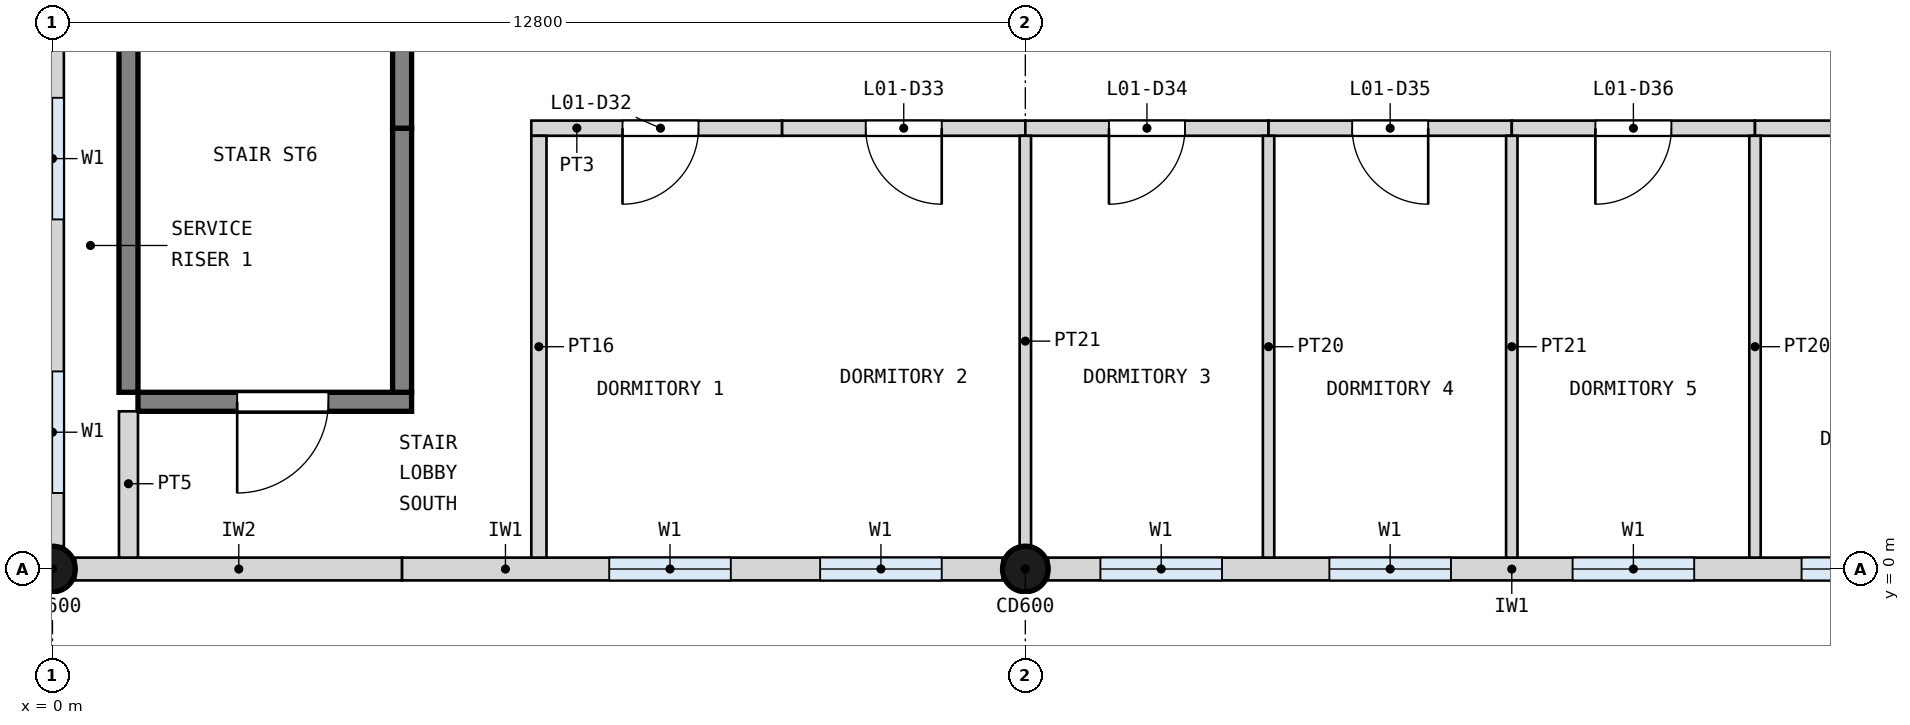
"""IFC4 building model, lengths in metres.
Left out: names, types, materials, properties, quantities, classifications, styles, units other than length and angle.
Written with IfcOpenShell. Run it as: python <this file> out.ifc"""

import sys

from ifc_helpers import new_model, si_unit, direction, frame, frame_2d, origin, origin_2d, place, context, subcontext, project, spatial, rectangle, circle, extrude, element, fill, save


model = new_model("IFC4")
c1 = context("Model", 3, precision=1e-05, world=origin(), true_north=direction((0.0, 1.0)))
c2 = subcontext(c1, "Body", "Model", "MODEL_VIEW")
j1 = project(units=[si_unit("LENGTHUNIT", "METRE"), si_unit("PLANEANGLEUNIT", "RADIAN")], contexts=[c1])
p1 = place(None, origin())
s1 = spatial("IfcSite", under=j1, at=p1, CompositionType="ELEMENT")
p2 = place(p1, origin())
s2 = spatial("IfcBuilding", under=s1, at=p2, CompositionType="ELEMENT")
p3 = place(p2, frame((0.0, 0.0, 4.2)))
s3 = spatial("IfcBuildingStorey", under=s2, at=p3, CompositionType="ELEMENT", Elevation=4.2)
for number, where, z_axis, x_axis in (
    (1, (0.0, 0.0, 0.0), (0.0, 0.0, 1.0), (1.0, 0.0, 0.0)),
    (2, (12.8, 0.0, 0.0), (0.0, 0.0, 1.0), (1.0, 0.0, 0.0)),
):
    element("IfcColumn", number, at=place(p3, frame(where, z_axis=z_axis, x_axis=x_axis)), inside=s3, PredefinedType="COLUMN", context=c2, shape_type="SweptSolid", body=[
        extrude(circle(Radius=0.3, at=origin_2d()), origin(), (0.0, 0.0, 1.0), 4.2),
    ])
p4 = place(p3, frame((0.3, 0.0, 0.0), z_axis=(0.0, 0.0, 1.0), x_axis=(1.0, 0.0, 0.0)))
e3 = element("IfcWall", 3, at=p4, inside=s3, PredefinedType="SOLIDWALL", context=c2, shape_type="SweptSolid", body=[
    extrude(rectangle(XDim=4.3, YDim=0.3, at=frame_2d((2.15, 0.0))), origin(), (0.0, 0.0, 1.0), 3.0),
])
p5 = place(p3, frame((4.6, 0.0, 0.0), z_axis=(0.0, 0.0, 1.0), x_axis=(1.0, 0.0, 0.0)))
e4 = element("IfcWall", 4, at=p5, inside=s3, PredefinedType="SOLIDWALL", context=c2, shape_type="SweptSolid", body=[
    extrude(rectangle(XDim=7.9, YDim=0.3, at=frame_2d((3.95, 0.0))), origin(), (0.0, 0.0, 1.0), 3.0),
])
p6 = place(p5, frame((2.725, 0.0, 1.0)))
e5 = element("IfcOpeningElement", 5, at=p6, cuts=e4, PredefinedType="OPENING", context=c2, shape_type="SweptSolid", body=[
    extrude(rectangle(XDim=1.6, YDim=1.8, at=frame_2d((0.8, 0.9))), frame((0.0, 0.16, 0.0), z_axis=(0.0, -1.0, 0.0), x_axis=(1.0, 0.0, 0.0)), (0.0, 0.0, 1.0), 0.32),
])
p7 = place(p5, frame((5.5, 0.0, 1.0)))
e6 = element("IfcOpeningElement", 6, at=p7, cuts=e4, PredefinedType="OPENING", context=c2, shape_type="SweptSolid", body=[
    extrude(rectangle(XDim=1.6, YDim=1.8, at=frame_2d((0.8, 0.9))), frame((0.0, 0.16, 0.0), z_axis=(0.0, -1.0, 0.0), x_axis=(1.0, 0.0, 0.0)), (0.0, 0.0, 1.0), 0.32),
])
p8 = place(p3, frame((13.1, 0.0, 0.0), z_axis=(0.0, 0.0, 1.0), x_axis=(1.0, 0.0, 0.0)))
e7 = element("IfcWall", 7, at=p8, inside=s3, PredefinedType="SOLIDWALL", context=c2, shape_type="SweptSolid", body=[
    extrude(rectangle(XDim=12.2, YDim=0.3, at=frame_2d((6.1, 0.0))), origin(), (0.0, 0.0, 1.0), 3.0),
])
p9 = place(p8, frame((0.688, 0.0, 1.0)))
e8 = element("IfcOpeningElement", 8, at=p9, cuts=e7, PredefinedType="OPENING", context=c2, shape_type="SweptSolid", body=[
    extrude(rectangle(XDim=1.6, YDim=1.8, at=frame_2d((0.8, 0.9))), frame((0.0, 0.16, 0.0), z_axis=(0.0, -1.0, 0.0), x_axis=(1.0, 0.0, 0.0)), (0.0, 0.0, 1.0), 0.32),
])
p10 = place(p8, frame((3.7, 0.0, 1.0)))
e9 = element("IfcOpeningElement", 9, at=p10, cuts=e7, PredefinedType="OPENING", context=c2, shape_type="SweptSolid", body=[
    extrude(rectangle(XDim=1.6, YDim=1.8, at=frame_2d((0.8, 0.9))), frame((0.0, 0.16, 0.0), z_axis=(0.0, -1.0, 0.0), x_axis=(1.0, 0.0, 0.0)), (0.0, 0.0, 1.0), 0.32),
])
p11 = place(p8, frame((6.9, 0.0, 1.0)))
e10 = element("IfcOpeningElement", 10, at=p11, cuts=e7, PredefinedType="OPENING", context=c2, shape_type="SweptSolid", body=[
    extrude(rectangle(XDim=1.6, YDim=1.8, at=frame_2d((0.8, 0.9))), frame((0.0, 0.16, 0.0), z_axis=(0.0, -1.0, 0.0), x_axis=(1.0, 0.0, 0.0)), (0.0, 0.0, 1.0), 0.32),
])
p12 = place(p8, frame((9.913, 0.0, 1.0)))
e11 = element("IfcOpeningElement", 11, at=p12, cuts=e7, PredefinedType="OPENING", context=c2, shape_type="SweptSolid", body=[
    extrude(rectangle(XDim=1.6, YDim=1.8, at=frame_2d((0.8, 0.9))), frame((0.0, 0.16, 0.0), z_axis=(0.0, -1.0, 0.0), x_axis=(1.0, 0.0, 0.0)), (0.0, 0.0, 1.0), 0.32),
])
p13 = place(p3, frame((0.0, 0.3, 0.0), z_axis=(0.0, 0.0, 1.0), x_axis=(0.0, 1.0, 0.0)))
e12 = element("IfcWall", 12, at=p13, inside=s3, PredefinedType="SOLIDWALL", context=c2, shape_type="SweptSolid", body=[
    extrude(rectangle(XDim=13.8, YDim=0.3, at=frame_2d((6.9, 0.0))), origin(), (0.0, 0.0, 1.0), 2.9),
])
p14 = place(p13, frame((0.7, 0.0, 1.0)))
e13 = element("IfcOpeningElement", 13, at=p14, cuts=e12, PredefinedType="OPENING", context=c2, shape_type="SweptSolid", body=[
    extrude(rectangle(XDim=1.6, YDim=1.8, at=frame_2d((0.8, 0.9))), frame((0.0, 0.16, 0.0), z_axis=(0.0, -1.0, 0.0), x_axis=(1.0, 0.0, 0.0)), (0.0, 0.0, 1.0), 0.32),
])
p15 = place(p13, frame((4.3, 0.0, 1.0)))
e14 = element("IfcOpeningElement", 14, at=p15, cuts=e12, PredefinedType="OPENING", context=c2, shape_type="SweptSolid", body=[
    extrude(rectangle(XDim=1.6, YDim=1.8, at=frame_2d((0.8, 0.9))), frame((0.0, 0.16, 0.0), z_axis=(0.0, -1.0, 0.0), x_axis=(1.0, 0.0, 0.0)), (0.0, 0.0, 1.0), 0.32),
])
p16 = place(p13, frame((11.5, 0.0, 1.0)))
e15 = element("IfcOpeningElement", 15, at=p16, cuts=e12, PredefinedType="OPENING", context=c2, shape_type="SweptSolid", body=[
    extrude(rectangle(XDim=1.6, YDim=1.8, at=frame_2d((0.8, 0.9))), frame((0.0, 0.16, 0.0), z_axis=(0.0, -1.0, 0.0), x_axis=(1.0, 0.0, 0.0)), (0.0, 0.0, 1.0), 0.32),
])
p17 = place(p3, frame((1.125, 2.2, 0.0), z_axis=(0.0, 0.0, 1.0), x_axis=(1.0, 0.0, 0.0)))
e16 = element("IfcWall", 16, at=p17, inside=s3, PredefinedType="SHEAR", context=c2, shape_type="SweptSolid", body=[
    extrude(rectangle(XDim=3.6, YDim=0.25, at=frame_2d((1.8, 0.0))), origin(), (0.0, 0.0, 1.0), 3.9),
])
p18 = place(p17, frame((1.305, 0.0, 0.0)))
e17 = element("IfcOpeningElement", 17, at=p18, cuts=e16, PredefinedType="OPENING", context=c2, shape_type="SweptSolid", body=[
    extrude(rectangle(XDim=1.2, YDim=2.1, at=frame_2d((0.6, 1.05))), frame((0.0, 0.135, 0.0), z_axis=(0.0, -1.0, 0.0), x_axis=(1.0, 0.0, 0.0)), (0.0, 0.0, 1.0), 0.27),
])
p19 = place(p3, frame((6.3, 5.8, 0.0), z_axis=(0.0, 0.0, 1.0), x_axis=(1.0, 0.0, 0.0)))
e18 = element("IfcWall", 18, at=p19, inside=s3, PredefinedType="PARTITIONING", context=c2, shape_type="SweptSolid", body=[
    extrude(rectangle(XDim=3.3, YDim=0.2, at=frame_2d((1.65, 0.0))), origin(), (0.0, 0.0, 1.0), 3.9),
])
p20 = place(p19, frame((1.2, 0.0, 0.0)))
e19 = element("IfcOpeningElement", 19, at=p20, cuts=e18, PredefinedType="OPENING", context=c2, shape_type="SweptSolid", body=[
    extrude(rectangle(XDim=1.0, YDim=2.1, at=frame_2d((0.5, 1.05))), frame((0.0, 0.11, 0.0), z_axis=(0.0, -1.0, 0.0), x_axis=(1.0, 0.0, 0.0)), (0.0, 0.0, 1.0), 0.22),
])
p21 = place(p3, frame((9.6, 5.8, 0.0), z_axis=(0.0, 0.0, 1.0), x_axis=(1.0, 0.0, 0.0)))
e20 = element("IfcWall", 20, at=p21, inside=s3, PredefinedType="PARTITIONING", context=c2, shape_type="SweptSolid", body=[
    extrude(rectangle(XDim=3.2, YDim=0.2, at=frame_2d((1.6, 0.0))), origin(), (0.0, 0.0, 1.0), 3.9),
])
p22 = place(p21, frame((1.1, 0.0, 0.0)))
e21 = element("IfcOpeningElement", 21, at=p22, cuts=e20, PredefinedType="OPENING", context=c2, shape_type="SweptSolid", body=[
    extrude(rectangle(XDim=1.0, YDim=2.1, at=frame_2d((0.5, 1.05))), frame((0.0, 0.11, 0.0), z_axis=(0.0, -1.0, 0.0), x_axis=(1.0, 0.0, 0.0)), (0.0, 0.0, 1.0), 0.22),
])
p23 = place(p3, frame((12.8, 5.8, 0.0), z_axis=(0.0, 0.0, 1.0), x_axis=(1.0, 0.0, 0.0)))
e22 = element("IfcWall", 22, at=p23, inside=s3, PredefinedType="PARTITIONING", context=c2, shape_type="SweptSolid", body=[
    extrude(rectangle(XDim=3.2, YDim=0.2, at=frame_2d((1.6, 0.0))), origin(), (0.0, 0.0, 1.0), 3.9),
])
p24 = place(p23, frame((1.1, 0.0, 0.0)))
e23 = element("IfcOpeningElement", 23, at=p24, cuts=e22, PredefinedType="OPENING", context=c2, shape_type="SweptSolid", body=[
    extrude(rectangle(XDim=1.0, YDim=2.1, at=frame_2d((0.5, 1.05))), frame((0.0, 0.11, 0.0), z_axis=(0.0, -1.0, 0.0), x_axis=(1.0, 0.0, 0.0)), (0.0, 0.0, 1.0), 0.22),
])
p25 = place(p3, frame((16.0, 5.8, 0.0), z_axis=(0.0, 0.0, 1.0), x_axis=(1.0, 0.0, 0.0)))
e24 = element("IfcWall", 24, at=p25, inside=s3, PredefinedType="PARTITIONING", context=c2, shape_type="SweptSolid", body=[
    extrude(rectangle(XDim=3.2, YDim=0.2, at=frame_2d((1.6, 0.0))), origin(), (0.0, 0.0, 1.0), 3.9),
])
p26 = place(p25, frame((1.1, 0.0, 0.0)))
e25 = element("IfcOpeningElement", 25, at=p26, cuts=e24, PredefinedType="OPENING", context=c2, shape_type="SweptSolid", body=[
    extrude(rectangle(XDim=1.0, YDim=2.1, at=frame_2d((0.5, 1.05))), frame((0.0, 0.11, 0.0), z_axis=(0.0, -1.0, 0.0), x_axis=(1.0, 0.0, 0.0)), (0.0, 0.0, 1.0), 0.22),
])
p27 = place(p3, frame((19.2, 5.8, 0.0), z_axis=(0.0, 0.0, 1.0), x_axis=(1.0, 0.0, 0.0)))
e26 = element("IfcWall", 26, at=p27, inside=s3, PredefinedType="PARTITIONING", context=c2, shape_type="SweptSolid", body=[
    extrude(rectangle(XDim=3.2, YDim=0.2, at=frame_2d((1.6, 0.0))), origin(), (0.0, 0.0, 1.0), 3.9),
])
p28 = place(p27, frame((1.1, 0.0, 0.0)))
e27 = element("IfcOpeningElement", 27, at=p28, cuts=e26, PredefinedType="OPENING", context=c2, shape_type="SweptSolid", body=[
    extrude(rectangle(XDim=1.0, YDim=2.1, at=frame_2d((0.5, 1.05))), frame((0.0, 0.11, 0.0), z_axis=(0.0, -1.0, 0.0), x_axis=(1.0, 0.0, 0.0)), (0.0, 0.0, 1.0), 0.22),
])
p29 = place(p3, frame((22.4, 5.8, 0.0), z_axis=(0.0, 0.0, 1.0), x_axis=(1.0, 0.0, 0.0)))
e28 = element("IfcWall", 28, at=p29, inside=s3, PredefinedType="PARTITIONING", context=c2, shape_type="SweptSolid", body=[
    extrude(rectangle(XDim=3.05, YDim=0.2, at=frame_2d((1.525, 0.0))), origin(), (0.0, 0.0, 1.0), 3.9),
])
p30 = place(p29, frame((1.1, 0.0, 0.0)))
e29 = element("IfcOpeningElement", 29, at=p30, cuts=e28, PredefinedType="OPENING", context=c2, shape_type="SweptSolid", body=[
    extrude(rectangle(XDim=1.0, YDim=2.1, at=frame_2d((0.5, 1.05))), frame((0.0, 0.11, 0.0), z_axis=(0.0, -1.0, 0.0), x_axis=(1.0, 0.0, 0.0)), (0.0, 0.0, 1.0), 0.22),
])
p31 = place(p3, frame((1.0, 0.15, 0.0), z_axis=(0.0, 0.0, 1.0), x_axis=(0.0, 1.0, 0.0)))
e30 = element("IfcWall", 30, at=p31, inside=s3, PredefinedType="PARTITIONING", context=c2, shape_type="SweptSolid", body=[
    extrude(rectangle(XDim=1.925, YDim=0.25, at=frame_2d((0.962, 0.0))), origin(), (0.0, 0.0, 1.0), 3.9),
])
p32 = place(p3, frame((1.0, 2.325, 0.0), z_axis=(0.0, 0.0, 1.0), x_axis=(0.0, 1.0, 0.0)))
e31 = element("IfcWall", 31, at=p32, inside=s3, PredefinedType="SHEAR", context=c2, shape_type="SweptSolid", body=[
    extrude(rectangle(XDim=5.75, YDim=0.25, at=frame_2d((2.875, 0.0))), origin(), (0.0, 0.0, 1.0), 3.9),
])
p33 = place(p3, frame((4.6, 2.325, 0.0), z_axis=(0.0, 0.0, 1.0), x_axis=(0.0, 1.0, 0.0)))
e32 = element("IfcWall", 32, at=p33, inside=s3, PredefinedType="SHEAR", context=c2, shape_type="SweptSolid", body=[
    extrude(rectangle(XDim=3.475, YDim=0.25, at=frame_2d((1.738, 0.0))), origin(), (0.0, 0.0, 1.0), 3.9),
])
p34 = place(p3, frame((4.6, 5.8, 0.0), z_axis=(0.0, 0.0, 1.0), x_axis=(0.0, 1.0, 0.0)))
e33 = element("IfcWall", 33, at=p34, inside=s3, PredefinedType="SHEAR", context=c2, shape_type="SweptSolid", body=[
    extrude(rectangle(XDim=2.275, YDim=0.25, at=frame_2d((1.137, 0.0))), origin(), (0.0, 0.0, 1.0), 3.9),
])
p35 = place(p3, frame((6.4, 0.15, 0.0), z_axis=(0.0, 0.0, 1.0), x_axis=(0.0, 1.0, 0.0)))
e34 = element("IfcWall", 34, at=p35, inside=s3, PredefinedType="PARTITIONING", context=c2, shape_type="SweptSolid", body=[
    extrude(rectangle(XDim=5.55, YDim=0.2, at=frame_2d((2.775, 0.0))), origin(), (0.0, 0.0, 1.0), 2.9),
])
p36 = place(p3, frame((12.8, 0.27, 0.0), z_axis=(0.0, 0.0, 1.0), x_axis=(0.0, 1.0, 0.0)))
e35 = element("IfcWall", 35, at=p36, inside=s3, PredefinedType="PARTITIONING", context=c2, shape_type="SweptSolid", body=[
    extrude(rectangle(XDim=5.43, YDim=0.15, at=frame_2d((2.715, 0.0))), origin(), (0.0, 0.0, 1.0), 2.9),
])
p37 = place(p3, frame((16.0, 0.15, 0.0), z_axis=(0.0, 0.0, 1.0), x_axis=(0.0, 1.0, 0.0)))
e36 = element("IfcWall", 36, at=p37, inside=s3, PredefinedType="PARTITIONING", context=c2, shape_type="SweptSolid", body=[
    extrude(rectangle(XDim=5.55, YDim=0.15, at=frame_2d((2.775, 0.0))), origin(), (0.0, 0.0, 1.0), 3.0),
])
p38 = place(p3, frame((19.2, 0.15, 0.0), z_axis=(0.0, 0.0, 1.0), x_axis=(0.0, 1.0, 0.0)))
e37 = element("IfcWall", 37, at=p38, inside=s3, PredefinedType="PARTITIONING", context=c2, shape_type="SweptSolid", body=[
    extrude(rectangle(XDim=5.55, YDim=0.15, at=frame_2d((2.775, 0.0))), origin(), (0.0, 0.0, 1.0), 2.9),
])
p39 = place(p3, frame((22.4, 0.15, 0.0), z_axis=(0.0, 0.0, 1.0), x_axis=(0.0, 1.0, 0.0)))
e38 = element("IfcWall", 38, at=p39, inside=s3, PredefinedType="PARTITIONING", context=c2, shape_type="SweptSolid", body=[
    extrude(rectangle(XDim=5.55, YDim=0.15, at=frame_2d((2.775, 0.0))), origin(), (0.0, 0.0, 1.0), 3.0),
])
p40 = place(p18, frame((1.2, 0.0, 0.0), z_axis=(0.0, 0.0, 1.0), x_axis=(-1.0, 0.0, 0.0)))
e39 = element("IfcDoor", 39, at=p40, inside=s3, OperationType="SINGLE_SWING_RIGHT", PredefinedType="DOOR", context=c2, shape_type="SweptSolid", body=[
    extrude(rectangle(XDim=1.2, YDim=2.1, at=frame_2d((0.6, 1.05))), frame((0.0, 0.025, 0.0), z_axis=(0.0, -1.0, 0.0), x_axis=(1.0, 0.0, 0.0)), (0.0, 0.0, 1.0), 0.05),
])
fill(e17, e39)
p41 = place(p20, frame((1.0, 0.0, 0.0), z_axis=(0.0, 0.0, 1.0), x_axis=(-1.0, 0.0, 0.0)))
e40 = element("IfcDoor", 40, at=p41, inside=s3, OperationType="SINGLE_SWING_RIGHT", PredefinedType="DOOR", context=c2, shape_type="SweptSolid", body=[
    extrude(rectangle(XDim=1.0, YDim=2.1, at=frame_2d((0.5, 1.05))), frame((0.0, 0.025, 0.0), z_axis=(0.0, -1.0, 0.0), x_axis=(1.0, 0.0, 0.0)), (0.0, 0.0, 1.0), 0.05),
])
fill(e19, e40)
p42 = place(p22, frame((1.0, 0.0, 0.0), z_axis=(0.0, 0.0, 1.0), x_axis=(-1.0, 0.0, 0.0)))
e41 = element("IfcDoor", 41, at=p42, inside=s3, OperationType="SINGLE_SWING_LEFT", PredefinedType="DOOR", context=c2, shape_type="SweptSolid", body=[
    extrude(rectangle(XDim=1.0, YDim=2.1, at=frame_2d((0.5, 1.05))), frame((0.0, 0.025, 0.0), z_axis=(0.0, -1.0, 0.0), x_axis=(1.0, 0.0, 0.0)), (0.0, 0.0, 1.0), 0.05),
])
fill(e21, e41)
p43 = place(p24, frame((1.0, 0.0, 0.0), z_axis=(0.0, 0.0, 1.0), x_axis=(-1.0, 0.0, 0.0)))
e42 = element("IfcDoor", 42, at=p43, inside=s3, OperationType="SINGLE_SWING_RIGHT", PredefinedType="DOOR", context=c2, shape_type="SweptSolid", body=[
    extrude(rectangle(XDim=1.0, YDim=2.1, at=frame_2d((0.5, 1.05))), frame((0.0, 0.025, 0.0), z_axis=(0.0, -1.0, 0.0), x_axis=(1.0, 0.0, 0.0)), (0.0, 0.0, 1.0), 0.05),
])
fill(e23, e42)
p44 = place(p26, frame((1.0, 0.0, 0.0), z_axis=(0.0, 0.0, 1.0), x_axis=(-1.0, 0.0, 0.0)))
e43 = element("IfcDoor", 43, at=p44, inside=s3, OperationType="SINGLE_SWING_LEFT", PredefinedType="DOOR", context=c2, shape_type="SweptSolid", body=[
    extrude(rectangle(XDim=1.0, YDim=2.1, at=frame_2d((0.5, 1.05))), frame((0.0, 0.025, 0.0), z_axis=(0.0, -1.0, 0.0), x_axis=(1.0, 0.0, 0.0)), (0.0, 0.0, 1.0), 0.05),
])
fill(e25, e43)
p45 = place(p28, frame((1.0, 0.0, 0.0), z_axis=(0.0, 0.0, 1.0), x_axis=(-1.0, 0.0, 0.0)))
e44 = element("IfcDoor", 44, at=p45, inside=s3, OperationType="SINGLE_SWING_RIGHT", PredefinedType="DOOR", context=c2, shape_type="SweptSolid", body=[
    extrude(rectangle(XDim=1.0, YDim=2.1, at=frame_2d((0.5, 1.05))), frame((0.0, 0.025, 0.0), z_axis=(0.0, -1.0, 0.0), x_axis=(1.0, 0.0, 0.0)), (0.0, 0.0, 1.0), 0.05),
])
fill(e27, e44)
p46 = place(p6, origin())
e45 = element("IfcWindow", 45, at=p46, inside=s3, PartitioningType="SINGLE_PANEL", PredefinedType="WINDOW", context=c2, shape_type="SweptSolid", body=[
    extrude(rectangle(XDim=1.6, YDim=1.8, at=frame_2d((0.8, 0.9))), frame((0.0, 0.03, 0.0), z_axis=(0.0, -1.0, 0.0), x_axis=(1.0, 0.0, 0.0)), (0.0, 0.0, 1.0), 0.06),
])
fill(e5, e45)
p47 = place(p7, origin())
e46 = element("IfcWindow", 46, at=p47, inside=s3, PartitioningType="SINGLE_PANEL", PredefinedType="WINDOW", context=c2, shape_type="SweptSolid", body=[
    extrude(rectangle(XDim=1.6, YDim=1.8, at=frame_2d((0.8, 0.9))), frame((0.0, 0.03, 0.0), z_axis=(0.0, -1.0, 0.0), x_axis=(1.0, 0.0, 0.0)), (0.0, 0.0, 1.0), 0.06),
])
fill(e6, e46)
p48 = place(p9, origin())
e47 = element("IfcWindow", 47, at=p48, inside=s3, PartitioningType="SINGLE_PANEL", PredefinedType="WINDOW", context=c2, shape_type="SweptSolid", body=[
    extrude(rectangle(XDim=1.6, YDim=1.8, at=frame_2d((0.8, 0.9))), frame((0.0, 0.03, 0.0), z_axis=(0.0, -1.0, 0.0), x_axis=(1.0, 0.0, 0.0)), (0.0, 0.0, 1.0), 0.06),
])
fill(e8, e47)
p49 = place(p10, origin())
e48 = element("IfcWindow", 48, at=p49, inside=s3, PartitioningType="SINGLE_PANEL", PredefinedType="WINDOW", context=c2, shape_type="SweptSolid", body=[
    extrude(rectangle(XDim=1.6, YDim=1.8, at=frame_2d((0.8, 0.9))), frame((0.0, 0.03, 0.0), z_axis=(0.0, -1.0, 0.0), x_axis=(1.0, 0.0, 0.0)), (0.0, 0.0, 1.0), 0.06),
])
fill(e9, e48)
p50 = place(p11, origin())
e49 = element("IfcWindow", 49, at=p50, inside=s3, PartitioningType="SINGLE_PANEL", PredefinedType="WINDOW", context=c2, shape_type="SweptSolid", body=[
    extrude(rectangle(XDim=1.6, YDim=1.8, at=frame_2d((0.8, 0.9))), frame((0.0, 0.03, 0.0), z_axis=(0.0, -1.0, 0.0), x_axis=(1.0, 0.0, 0.0)), (0.0, 0.0, 1.0), 0.06),
])
fill(e10, e49)
p51 = place(p12, origin())
e50 = element("IfcWindow", 50, at=p51, inside=s3, PartitioningType="SINGLE_PANEL", PredefinedType="WINDOW", context=c2, shape_type="SweptSolid", body=[
    extrude(rectangle(XDim=1.6, YDim=1.8, at=frame_2d((0.8, 0.9))), frame((0.0, 0.03, 0.0), z_axis=(0.0, -1.0, 0.0), x_axis=(1.0, 0.0, 0.0)), (0.0, 0.0, 1.0), 0.06),
])
fill(e11, e50)
p52 = place(p14, origin())
e51 = element("IfcWindow", 51, at=p52, inside=s3, PartitioningType="SINGLE_PANEL", PredefinedType="WINDOW", context=c2, shape_type="SweptSolid", body=[
    extrude(rectangle(XDim=1.6, YDim=1.8, at=frame_2d((0.8, 0.9))), frame((0.0, 0.03, 0.0), z_axis=(0.0, -1.0, 0.0), x_axis=(1.0, 0.0, 0.0)), (0.0, 0.0, 1.0), 0.06),
])
fill(e13, e51)
p53 = place(p15, origin())
e52 = element("IfcWindow", 52, at=p53, inside=s3, PartitioningType="SINGLE_PANEL", PredefinedType="WINDOW", context=c2, shape_type="SweptSolid", body=[
    extrude(rectangle(XDim=1.6, YDim=1.8, at=frame_2d((0.8, 0.9))), frame((0.0, 0.03, 0.0), z_axis=(0.0, -1.0, 0.0), x_axis=(1.0, 0.0, 0.0)), (0.0, 0.0, 1.0), 0.06),
])
fill(e14, e52)
save(model, sys.argv[1])
